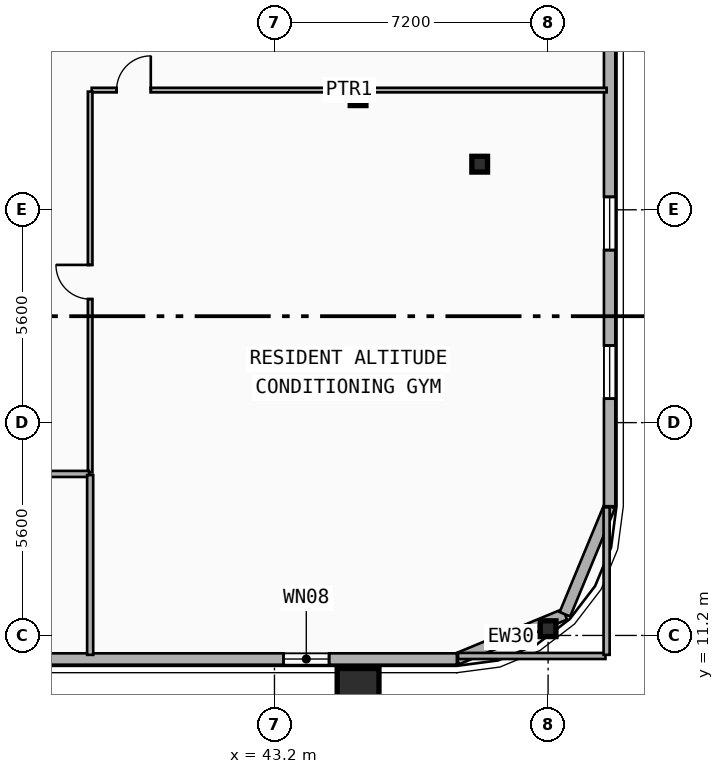
"""IFC4 building model, lengths in metres.
Left out: names, types, materials, properties, quantities, classifications, styles, units other than length and angle.
Written with IfcOpenShell. Run it as: python <this file> out.ifc"""

import sys

from ifc_helpers import new_model, si_unit, direction, frame, frame_2d, origin, origin_2d, place, context, subcontext, project, spatial, rectangle, i_section, extrude, element, fill, save


model = new_model("IFC4")
c1 = context("Model", 3, precision=1e-05, world=origin(), true_north=direction((0.0, 1.0)))
c2 = subcontext(c1, "Body", "Model", "MODEL_VIEW")
j1 = project(units=[si_unit("LENGTHUNIT", "METRE"), si_unit("PLANEANGLEUNIT", "RADIAN")], contexts=[c1])
p1 = place(None, origin())
s1 = spatial("IfcSite", under=j1, at=p1, CompositionType="ELEMENT")
p2 = place(p1, origin())
s2 = spatial("IfcBuilding", under=s1, at=p2, CompositionType="ELEMENT")
p3 = place(p2, frame((0.0, 0.0, 180.3)))
s3 = spatial("IfcBuildingStorey", under=s2, at=p3, CompositionType="ELEMENT", Elevation=180.3)
p4 = place(p3, frame((45.4, 25.35, 0.0), z_axis=(0.0, 0.0, 1.0), x_axis=(1.0, 0.0, 0.0)))
e1 = element("IfcColumn", 1, at=p4, inside=s3, PredefinedType="COLUMN", context=c2, shape_type="SweptSolid", body=[
    extrude(i_section(OverallWidth=0.413, OverallDepth=0.415, WebThickness=0.03, FlangeThickness=0.047, FilletRadius=0.015, at=origin_2d()), origin(), (0.0, 0.0, 1.0), 3.55),
])
p5 = place(p3, frame((45.4, 9.889, 0.0), z_axis=(0.0, -0.0902702026, 0.995917311087), x_axis=(1.0, 0.0, 0.0)))
e2 = element("IfcColumn", 2, at=p5, inside=s3, PredefinedType="COLUMN", context=c2, shape_type="SweptSolid", body=[
    extrude(rectangle(XDim=1.1, YDim=1.1, at=origin_2d()), origin(), (0.0, 0.0, 1.0), 3.565),
])
p6 = place(p3, frame((48.6, 23.6, 0.0), z_axis=(0.0, 0.0, 1.0), x_axis=(1.0, 0.0, 0.0)))
e3 = element("IfcColumn", 3, at=p6, inside=s3, PredefinedType="COLUMN", context=c2, shape_type="SweptSolid", body=[
    extrude(i_section(OverallWidth=0.413, OverallDepth=0.415, WebThickness=0.03, FlangeThickness=0.047, FilletRadius=0.015, at=origin_2d()), origin(), (0.0, 0.0, 1.0), 3.55),
])
p7 = place(p3, frame((50.4, 11.473, 0.0), z_axis=(0.0, -0.079862380324, 0.996805898964), x_axis=(1.0, 0.0, 0.0)))
e4 = element("IfcColumn", 4, at=p7, inside=s3, PredefinedType="COLUMN", context=c2, shape_type="SweptSolid", body=[
    extrude(i_section(OverallWidth=0.413, OverallDepth=0.415, WebThickness=0.03, FlangeThickness=0.047, FilletRadius=0.015, at=origin_2d()), origin(), (0.0, 0.0, 1.0), 3.562),
])
p8 = place(p3, frame((50.843, 11.757, 0.0), z_axis=(0.0, 0.0, 1.0), x_axis=(-0.92389884758, -0.382636798336, 0.0)))
e5 = element("IfcWall", 5, at=p8, inside=s3, PredefinedType="SOLIDWALL", context=c2, shape_type="SweptSolid", body=[
    extrude(rectangle(XDim=3.077, YDim=0.3, at=frame_2d((1.538, 0.0))), origin(), (0.0, 0.0, 1.0), 3.29),
])
p9 = place(p3, frame((52.02, 14.6, 0.0), z_axis=(0.0, 0.0, 1.0), x_axis=(-0.382676475685, -0.923882414032, 0.0)))
e6 = element("IfcWall", 6, at=p9, inside=s3, PredefinedType="SOLIDWALL", context=c2, shape_type="SweptSolid", body=[
    extrude(rectangle(XDim=3.077, YDim=0.3, at=frame_2d((1.539, 0.0))), origin(), (0.0, 0.0, 1.0), 3.29),
])
p10 = place(p3, frame((52.02, 37.6, 0.0), z_axis=(0.0, 0.0, 1.0), x_axis=(0.0, -1.0, 0.0)))
e7 = element("IfcWall", 7, at=p10, inside=s3, PredefinedType="SOLIDWALL", context=c2, shape_type="SweptSolid", body=[
    extrude(rectangle(XDim=23.0, YDim=0.3, at=frame_2d((11.5, 0.0))), origin(), (0.0, 0.0, 1.0), 3.29),
])
p11 = place(p10, frame((2.513, 0.0, 0.34)))
e8 = element("IfcOpeningElement", 8, at=p11, cuts=e7, PredefinedType="OPENING", context=c2, shape_type="SweptSolid", body=[
    extrude(rectangle(XDim=1.4, YDim=2.1, at=frame_2d((0.7, 1.05))), frame((0.0, 0.16, 0.0), z_axis=(0.0, -1.0, 0.0), x_axis=(1.0, 0.0, 0.0)), (0.0, 0.0, 1.0), 0.32),
])
p12 = place(p10, frame((6.107, 0.0, 0.34)))
e9 = element("IfcOpeningElement", 9, at=p12, cuts=e7, PredefinedType="OPENING", context=c2, shape_type="SweptSolid", body=[
    extrude(rectangle(XDim=1.4, YDim=2.1, at=frame_2d((0.7, 1.05))), frame((0.0, 0.16, 0.0), z_axis=(0.0, -1.0, 0.0), x_axis=(1.0, 0.0, 0.0)), (0.0, 0.0, 1.0), 0.32),
])
p13 = place(p10, frame((14.86, 0.0, 0.34)))
e10 = element("IfcOpeningElement", 10, at=p13, cuts=e7, PredefinedType="OPENING", context=c2, shape_type="SweptSolid", body=[
    extrude(rectangle(XDim=1.4, YDim=2.1, at=frame_2d((0.7, 1.05))), frame((0.0, 0.16, 0.0), z_axis=(0.0, -1.0, 0.0), x_axis=(1.0, 0.0, 0.0)), (0.0, 0.0, 1.0), 0.32),
])
p14 = place(p10, frame((18.77, 0.0, 0.34)))
e11 = element("IfcOpeningElement", 11, at=p14, cuts=e7, PredefinedType="OPENING", context=c2, shape_type="SweptSolid", body=[
    extrude(rectangle(XDim=1.4, YDim=2.1, at=frame_2d((0.7, 1.05))), frame((0.0, 0.16, 0.0), z_axis=(0.0, -1.0, 0.0), x_axis=(1.0, 0.0, 0.0)), (0.0, 0.0, 1.0), 0.32),
])
p15 = place(p3, frame((48.0, 10.58, 0.0), z_axis=(0.0, 0.0, 1.0), x_axis=(-1.0, 0.0, 0.0)))
e12 = element("IfcWall", 12, at=p15, inside=s3, PredefinedType="SOLIDWALL", context=c2, shape_type="SweptSolid", body=[
    extrude(rectangle(XDim=38.4, YDim=0.3, at=frame_2d((19.2, 0.0))), origin(), (0.0, 0.0, 1.0), 3.29),
])
p16 = place(p15, frame((36.621, 0.0, 0.75)))
e13 = element("IfcOpeningElement", 13, at=p16, cuts=e12, PredefinedType="OPENING", context=c2, shape_type="SweptSolid", body=[
    extrude(rectangle(XDim=1.4, YDim=1.8, at=frame_2d((0.7, 0.9))), frame((0.0, 0.16, 0.0), z_axis=(0.0, -1.0, 0.0), x_axis=(1.0, 0.0, 0.0)), (0.0, 0.0, 1.0), 0.32),
])
p17 = place(p15, frame((33.637, 0.0, 0.34)))
e14 = element("IfcOpeningElement", 14, at=p17, cuts=e12, PredefinedType="OPENING", context=c2, shape_type="SweptSolid", body=[
    extrude(rectangle(XDim=1.4, YDim=1.8, at=frame_2d((0.7, 0.9))), frame((0.0, 0.16, 0.0), z_axis=(0.0, -1.0, 0.0), x_axis=(1.0, 0.0, 0.0)), (0.0, 0.0, 1.0), 0.32),
])
p18 = place(p15, frame((20.031, 0.0, 0.65)))
e15 = element("IfcOpeningElement", 15, at=p18, cuts=e12, PredefinedType="OPENING", context=c2, shape_type="SweptSolid", body=[
    extrude(rectangle(XDim=2.1, YDim=2.1, at=frame_2d((1.05, 1.05))), frame((0.0, 0.16, 0.0), z_axis=(0.0, -1.0, 0.0), x_axis=(1.0, 0.0, 0.0)), (0.0, 0.0, 1.0), 0.32),
])
p19 = place(p15, frame((22.95, 0.0, 0.8)))
e16 = element("IfcOpeningElement", 16, at=p19, cuts=e12, PredefinedType="OPENING", context=c2, shape_type="SweptSolid", body=[
    extrude(rectangle(XDim=1.8, YDim=1.8, at=frame_2d((0.9, 0.9))), frame((0.0, 0.16, 0.0), z_axis=(0.0, -1.0, 0.0), x_axis=(1.0, 0.0, 0.0)), (0.0, 0.0, 1.0), 0.32),
])
p20 = place(p15, frame((13.581, 0.0, 0.65)))
e17 = element("IfcOpeningElement", 17, at=p20, cuts=e12, PredefinedType="OPENING", context=c2, shape_type="SweptSolid", body=[
    extrude(rectangle(XDim=2.1, YDim=2.1, at=frame_2d((1.05, 1.05))), frame((0.0, 0.16, 0.0), z_axis=(0.0, -1.0, 0.0), x_axis=(1.0, 0.0, 0.0)), (0.0, 0.0, 1.0), 0.32),
])
p21 = place(p15, frame((3.363, 0.0, 1.05)))
e18 = element("IfcOpeningElement", 18, at=p21, cuts=e12, PredefinedType="OPENING", context=c2, shape_type="SweptSolid", body=[
    extrude(rectangle(XDim=1.2, YDim=1.5, at=frame_2d((0.6, 0.75))), frame((0.0, 0.16, 0.0), z_axis=(0.0, -1.0, 0.0), x_axis=(1.0, 0.0, 0.0)), (0.0, 0.0, 1.0), 0.32),
])
p22 = place(p3, frame((38.39, 25.55, 0.0), z_axis=(0.0, 0.0, 1.0), x_axis=(1.0, 0.0, 0.0)))
e19 = element("IfcWall", 19, at=p22, inside=s3, PredefinedType="PARTITIONING", context=c2, shape_type="SweptSolid", body=[
    extrude(rectangle(XDim=13.55, YDim=0.12, at=frame_2d((6.775, 0.0))), origin(), (0.0, 0.0, 1.0), 2.37),
])
p23 = place(p22, frame((0.656, 0.0, 0.0)))
e20 = element("IfcOpeningElement", 20, at=p23, cuts=e19, PredefinedType="OPENING", context=c2, shape_type="SweptSolid", body=[
    extrude(rectangle(XDim=0.9, YDim=2.1, at=frame_2d((0.45, 1.05))), frame((0.0, 0.07, 0.0), z_axis=(0.0, -1.0, 0.0), x_axis=(1.0, 0.0, 0.0)), (0.0, 0.0, 1.0), 0.14),
])
p24 = place(p3, frame((38.35, 15.49, 0.0), z_axis=(0.0, 0.0, 1.0), x_axis=(0.0, 1.0, 0.0)))
e21 = element("IfcWall", 21, at=p24, inside=s3, PredefinedType="PARTITIONING", context=c2, shape_type="SweptSolid", body=[
    extrude(rectangle(XDim=10.02, YDim=0.12, at=frame_2d((5.01, 0.0))), origin(), (0.0, 0.0, 1.0), 2.82),
])
p25 = place(p24, frame((4.56, 0.0, 0.0)))
e22 = element("IfcOpeningElement", 22, at=p25, cuts=e21, PredefinedType="OPENING", context=c2, shape_type="SweptSolid", body=[
    extrude(rectangle(XDim=0.9, YDim=2.1, at=frame_2d((0.45, 1.05))), frame((0.0, 0.07, 0.0), z_axis=(0.0, -1.0, 0.0), x_axis=(1.0, 0.0, 0.0)), (0.0, 0.0, 1.0), 0.14),
])
p26 = place(p3, frame((36.38, 15.45, 0.0), z_axis=(0.0, 0.0, 1.0), x_axis=(1.0, 0.0, 0.0)))
e23 = element("IfcWall", 23, at=p26, inside=s3, PredefinedType="PARTITIONING", context=c2, shape_type="SweptSolid", body=[
    extrude(rectangle(XDim=1.94, YDim=0.16, at=frame_2d((0.97, 0.0))), origin(), (0.0, 0.0, 1.0), 2.37),
])
p27 = place(p3, frame((48.03, 10.66, 0.0), z_axis=(0.0, 0.0, 1.0), x_axis=(1.0, 0.0, 0.0)))
e24 = element("IfcWall", 24, at=p27, inside=s3, PredefinedType="PARTITIONING", context=c2, shape_type="SweptSolid", body=[
    extrude(rectangle(XDim=3.88, YDim=0.16, at=frame_2d((1.94, 0.0))), origin(), (0.0, 0.0, 1.0), 2.62),
])
p28 = place(p3, frame((38.35, 10.69, 0.0), z_axis=(0.0, 0.0, 1.0), x_axis=(0.0, 1.0, 0.0)))
e25 = element("IfcWall", 25, at=p28, inside=s3, PredefinedType="PARTITIONING", context=c2, shape_type="SweptSolid", body=[
    extrude(rectangle(XDim=4.73, YDim=0.16, at=frame_2d((2.365, 0.0))), origin(), (0.0, 0.0, 1.0), 2.96),
])
p29 = place(p3, frame((51.94, 10.69, 0.0), z_axis=(0.0, 0.0, 1.0), x_axis=(0.0, 1.0, 0.0)))
e26 = element("IfcWall", 26, at=p29, inside=s3, PredefinedType="PARTITIONING", context=c2, shape_type="SweptSolid", body=[
    extrude(rectangle(XDim=3.88, YDim=0.16, at=frame_2d((1.94, 0.0))), origin(), (0.0, 0.0, 1.0), 3.29),
])
p30 = place(p13, origin())
e27 = element("IfcWindow", 27, at=p30, inside=s3, PartitioningType="SINGLE_PANEL", PredefinedType="WINDOW", context=c2, shape_type="SweptSolid", body=[
    extrude(rectangle(XDim=1.4, YDim=2.1, at=frame_2d((0.7, 1.05))), frame((0.0, 0.03, 0.0), z_axis=(0.0, -1.0, 0.0), x_axis=(1.0, 0.0, 0.0)), (0.0, 0.0, 1.0), 0.06),
])
fill(e10, e27)
p31 = place(p14, origin())
e28 = element("IfcWindow", 28, at=p31, inside=s3, PartitioningType="SINGLE_PANEL", PredefinedType="WINDOW", context=c2, shape_type="SweptSolid", body=[
    extrude(rectangle(XDim=1.4, YDim=2.1, at=frame_2d((0.7, 1.05))), frame((0.0, 0.03, 0.0), z_axis=(0.0, -1.0, 0.0), x_axis=(1.0, 0.0, 0.0)), (0.0, 0.0, 1.0), 0.06),
])
fill(e11, e28)
p32 = place(p21, origin())
e29 = element("IfcWindow", 29, at=p32, inside=s3, PartitioningType="SINGLE_PANEL", PredefinedType="WINDOW", context=c2, shape_type="SweptSolid", body=[
    extrude(rectangle(XDim=1.2, YDim=1.5, at=frame_2d((0.6, 0.75))), frame((0.0, 0.03, 0.0), z_axis=(0.0, -1.0, 0.0), x_axis=(1.0, 0.0, 0.0)), (0.0, 0.0, 1.0), 0.06),
])
fill(e18, e29)
p33 = place(p23, origin())
e30 = element("IfcDoor", 30, at=p33, inside=s3, OperationType="SINGLE_SWING_RIGHT", PredefinedType="DOOR", context=c2, shape_type="SweptSolid", body=[
    extrude(rectangle(XDim=0.9, YDim=2.1, at=frame_2d((0.45, 1.05))), frame((0.0, 0.025, 0.0), z_axis=(0.0, -1.0, 0.0), x_axis=(1.0, 0.0, 0.0)), (0.0, 0.0, 1.0), 0.05),
])
fill(e20, e30)
p34 = place(p25, origin())
e31 = element("IfcDoor", 31, at=p34, inside=s3, OperationType="SINGLE_SWING_RIGHT", PredefinedType="DOOR", context=c2, shape_type="SweptSolid", body=[
    extrude(rectangle(XDim=0.9, YDim=2.1, at=frame_2d((0.45, 1.05))), frame((0.0, 0.025, 0.0), z_axis=(0.0, -1.0, 0.0), x_axis=(1.0, 0.0, 0.0)), (0.0, 0.0, 1.0), 0.05),
])
fill(e22, e31)
save(model, sys.argv[1])
